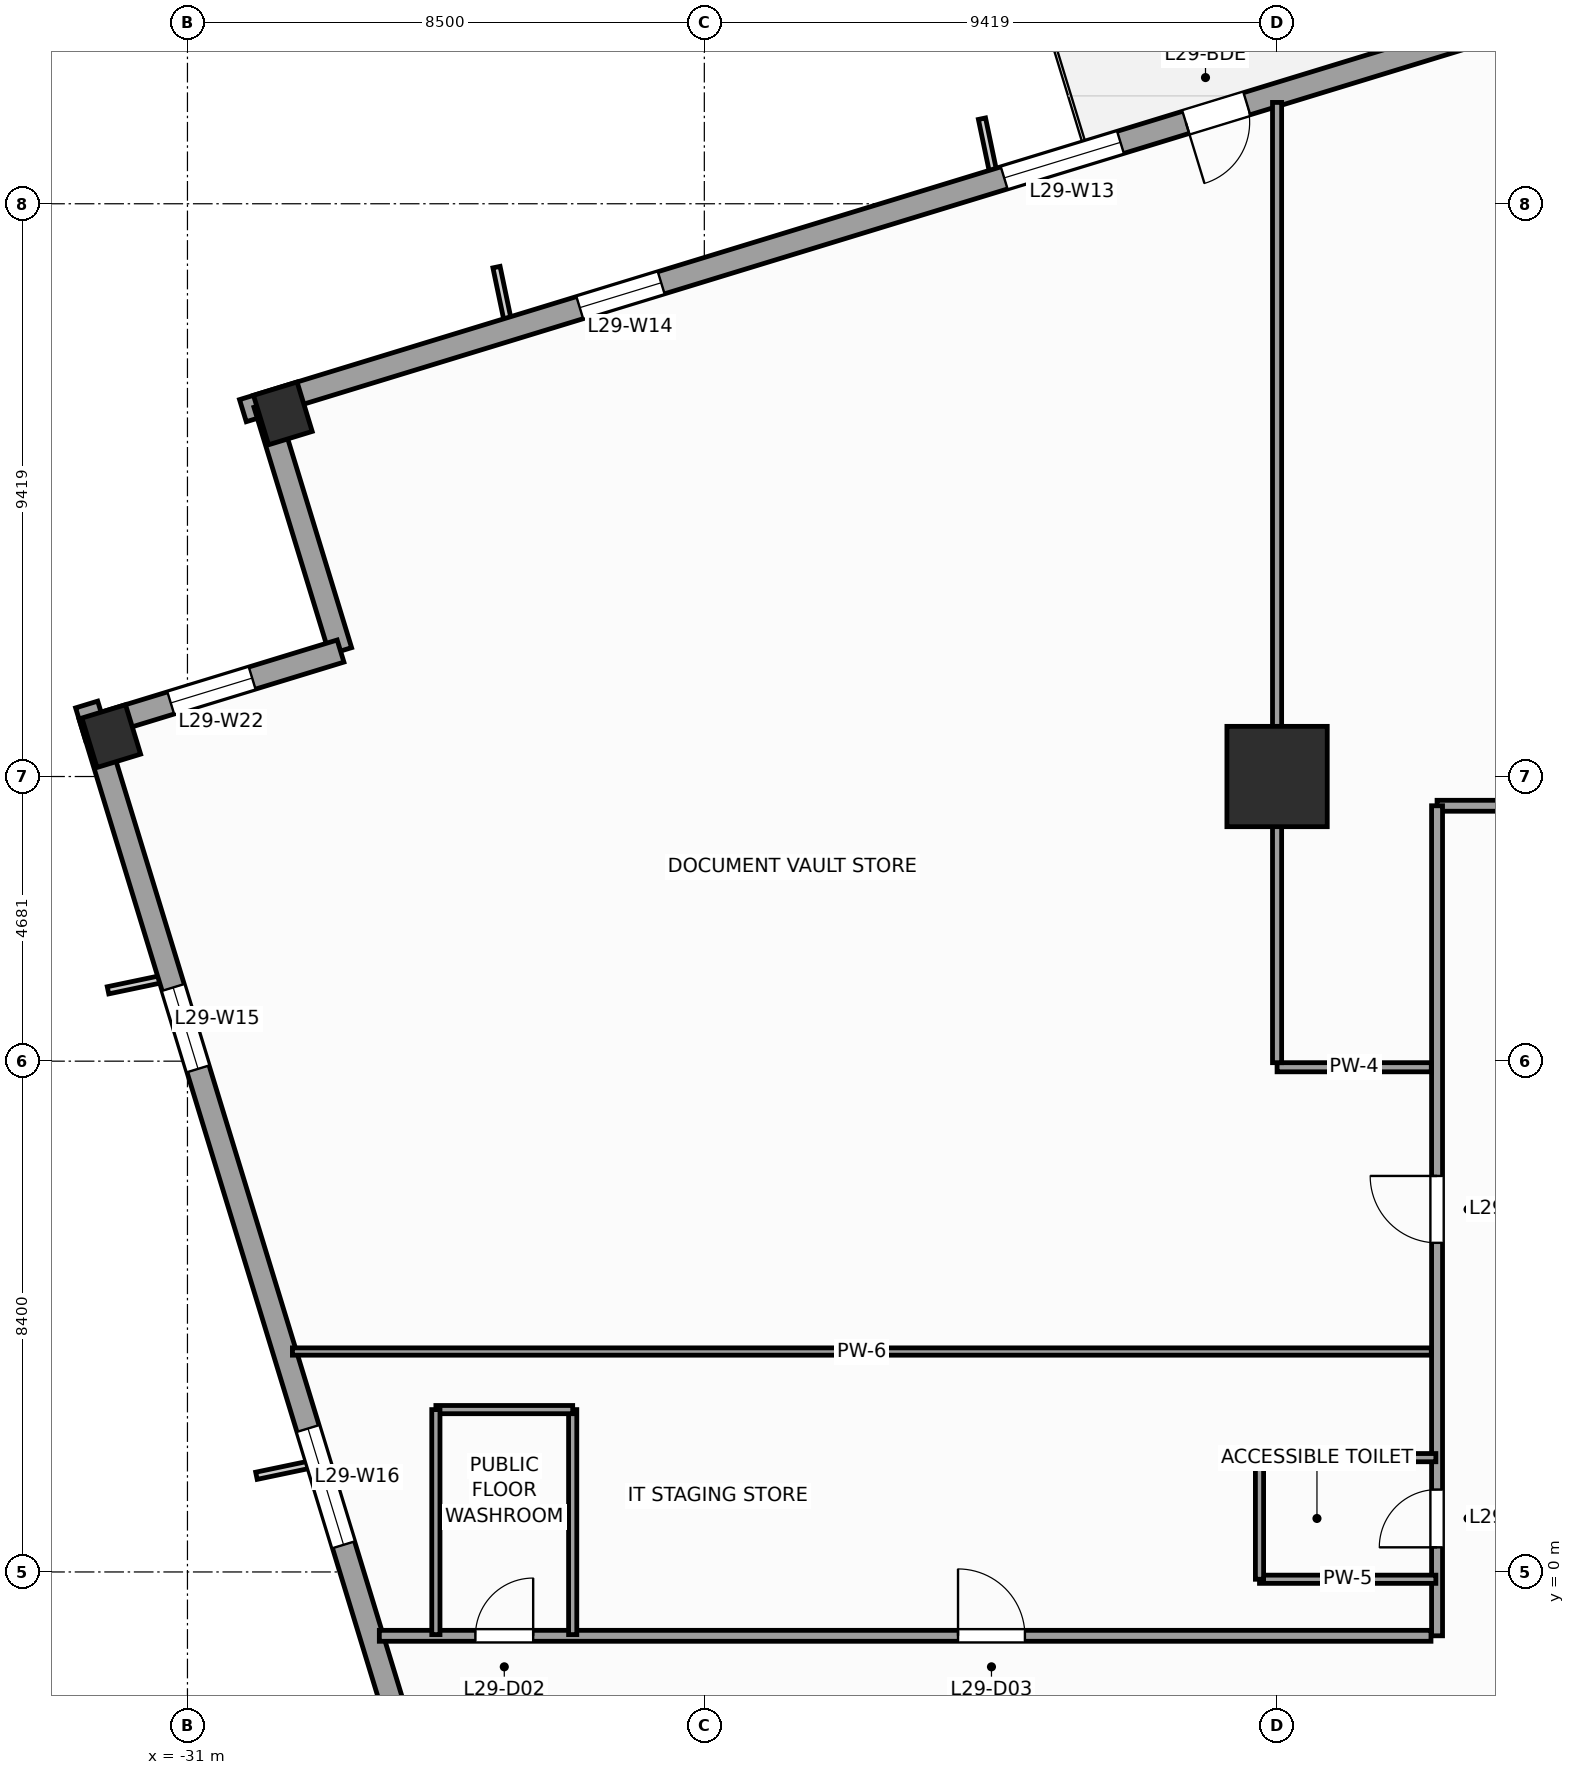
"""IFC4 building model, lengths in metres.
Left out: names, types, materials, properties, quantities, classifications, styles, units other than length and angle.
Written with IfcOpenShell. Run it as: python <this file> out.ifc"""

import sys

from ifc_helpers import new_model, si_unit, direction, frame, frame_2d, origin, origin_2d, place, context, subcontext, project, spatial, rectangle, extrude, source, transform, mapped, element, fill, save


model = new_model("IFC4")
c1 = context("Model", 3, precision=1e-05, world=origin(), true_north=direction((0.0, 1.0)))
c2 = subcontext(c1, "Body", "Model", "MODEL_VIEW")
j1 = project(units=[si_unit("LENGTHUNIT", "METRE"), si_unit("PLANEANGLEUNIT", "RADIAN")], contexts=[c1])
p1 = place(None, origin())
s1 = spatial("IfcSite", under=j1, at=p1, CompositionType="ELEMENT")
p2 = place(p1, origin())
s2 = spatial("IfcBuilding", under=s1, at=p2, CompositionType="ELEMENT")
p3 = place(p2, frame((0.0, 0.0, 123.2)))
s3 = spatial("IfcBuildingStorey", under=s2, at=p3, CompositionType="ELEMENT", Elevation=123.2)
m1 = source(origin(), c2, "Body", "SweptSolid", [
    extrude(rectangle(XDim=1.65, YDim=1.65, at=origin_2d()), origin(), (0.0, 0.0, 1.0), 4.0),
])
p4 = place(p3, frame((-13.081, 13.081, 0.0), z_axis=(0.0, 0.0, 1.0), x_axis=(1.0, 0.0, 0.0)))
e1 = element("IfcColumn", 1, at=p4, inside=s3, PredefinedType="COLUMN", context=c2, shape_type="MappedRepresentation", body=[
    mapped(m1, transform((0.0, 0.0, 0.0), scale=1.0)),
])
m2 = source(origin(), c2, "Body", "SweptSolid", [
    extrude(rectangle(XDim=0.75, YDim=0.85, at=origin_2d()), origin(), (0.0, 0.0, 1.0), 4.0),
])
for number, where, z_axis, x_axis in (
    (2, (-29.431, 19.052, 0.0), (0.0, 0.0, 1.0), (0.956, 0.292, 0.0)),
    (3, (-32.253, 13.746, 0.0), (0.0, 0.0, 1.0), (0.956, 0.292, 0.0)),
):
    element("IfcColumn", number, at=place(p3, frame(where, z_axis=z_axis, x_axis=x_axis)), inside=s3, PredefinedType="COLUMN", context=c2, shape_type="MappedRepresentation", body=[
        mapped(m2, transform((0.0, 0.0, 0.0), scale=1.0)),
    ])
p5 = place(p3, frame((14.265, 32.658, 0.0), z_axis=(0.0, 0.0, 1.0), x_axis=(-0.956304320851, -0.292373127906, 0.0)))
e4 = element("IfcWall", 4, at=p5, inside=s3, PredefinedType="STANDARD", context=c2, shape_type="SweptSolid", body=[
    extrude(rectangle(XDim=46.38, YDim=0.38, at=frame_2d((23.19, 0.0))), origin(), (0.0, 0.0, 1.0), 3.14),
])
p6 = place(p5, frame((29.115, 0.0, 0.0)))
e5 = element("IfcOpeningElement", 5, at=p6, cuts=e4, PredefinedType="OPENING", context=c2, shape_type="SweptSolid", body=[
    extrude(rectangle(XDim=1.05, YDim=2.25, at=frame_2d((0.525, 1.125))), frame((0.0, 0.2, 0.0), z_axis=(0.0, -1.0, 0.0), x_axis=(1.0, 0.0, 0.0)), (0.0, 0.0, 1.0), 0.4),
])
p7 = place(p5, frame((4.865, 0.0, 0.51)))
e6 = element("IfcOpeningElement", 6, at=p7, cuts=e4, PredefinedType="OPENING", context=c2, shape_type="SweptSolid", body=[
    extrude(rectangle(XDim=1.4, YDim=2.4, at=frame_2d((0.7, 1.2))), frame((0.0, 0.2, 0.0), z_axis=(0.0, -1.0, 0.0), x_axis=(1.0, 0.0, 0.0)), (0.0, 0.0, 1.0), 0.4),
])
p8 = place(p5, frame((12.45, 0.0, 0.51)))
e7 = element("IfcOpeningElement", 7, at=p8, cuts=e4, PredefinedType="OPENING", context=c2, shape_type="SweptSolid", body=[
    extrude(rectangle(XDim=2.0, YDim=2.4, at=frame_2d((1.0, 1.2))), frame((0.0, 0.2, 0.0), z_axis=(0.0, -1.0, 0.0), x_axis=(1.0, 0.0, 0.0)), (0.0, 0.0, 1.0), 0.4),
])
p9 = place(p5, frame((20.512, 0.0, 0.51)))
e8 = element("IfcOpeningElement", 8, at=p9, cuts=e4, PredefinedType="OPENING", context=c2, shape_type="SweptSolid", body=[
    extrude(rectangle(XDim=2.0, YDim=2.4, at=frame_2d((1.0, 1.2))), frame((0.0, 0.2, 0.0), z_axis=(0.0, -1.0, 0.0), x_axis=(1.0, 0.0, 0.0)), (0.0, 0.0, 1.0), 0.4),
])
p10 = place(p5, frame((31.288, 0.0, 0.51)))
e9 = element("IfcOpeningElement", 9, at=p10, cuts=e4, PredefinedType="OPENING", context=c2, shape_type="SweptSolid", body=[
    extrude(rectangle(XDim=2.0, YDim=2.4, at=frame_2d((1.0, 1.2))), frame((0.0, 0.2, 0.0), z_axis=(0.0, -1.0, 0.0), x_axis=(1.0, 0.0, 0.0)), (0.0, 0.0, 1.0), 0.4),
])
p11 = place(p5, frame((39.187, 0.0, 0.51)))
e10 = element("IfcOpeningElement", 10, at=p11, cuts=e4, PredefinedType="OPENING", context=c2, shape_type="SweptSolid", body=[
    extrude(rectangle(XDim=1.4, YDim=2.4, at=frame_2d((0.7, 1.2))), frame((0.0, 0.2, 0.0), z_axis=(0.0, -1.0, 0.0), x_axis=(1.0, 0.0, 0.0)), (0.0, 0.0, 1.0), 0.4),
])
p12 = place(p3, frame((-29.725, 19.208, 0.0), z_axis=(0.0, 0.0, 1.0), x_axis=(0.292345507338, -0.956312764915, 0.0)))
e11 = element("IfcWall", 11, at=p12, inside=s3, PredefinedType="STANDARD", context=c2, shape_type="SweptSolid", body=[
    extrude(rectangle(XDim=4.25, YDim=0.38, at=frame_2d((2.125, 0.0))), origin(), (0.0, 0.0, 1.0), 3.74),
])
p13 = place(p3, frame((-28.482, 15.144, 0.0), z_axis=(0.0, 0.0, 1.0), x_axis=(-0.956304176051, -0.292373601522, 0.0)))
e12 = element("IfcWall", 12, at=p13, inside=s3, PredefinedType="STANDARD", context=c2, shape_type="SweptSolid", body=[
    extrude(rectangle(XDim=4.44, YDim=0.38, at=frame_2d((2.22, 0.0))), origin(), (0.0, 0.0, 1.0), 3.04),
])
p14 = place(p13, frame((1.52, 0.0, 0.51)))
e13 = element("IfcOpeningElement", 13, at=p14, cuts=e12, PredefinedType="OPENING", context=c2, shape_type="SweptSolid", body=[
    extrude(rectangle(XDim=1.4, YDim=2.4, at=frame_2d((0.7, 1.2))), frame((0.0, 0.2, 0.0), z_axis=(0.0, -1.0, 0.0), x_axis=(1.0, 0.0, 0.0)), (0.0, 0.0, 1.0), 0.4),
])
p15 = place(p3, frame((-32.658, 14.265, 0.0), z_axis=(0.0, 0.0, 1.0), x_axis=(0.292373127906, -0.956304320851, 0.0)))
e14 = element("IfcWall", 14, at=p15, inside=s3, PredefinedType="STANDARD", context=c2, shape_type="SweptSolid", body=[
    extrude(rectangle(XDim=46.38, YDim=0.38, at=frame_2d((23.19, 0.0))), origin(), (0.0, 0.0, 1.0), 3.14),
])
p16 = place(p15, frame((4.865, 0.0, 0.51)))
e15 = element("IfcOpeningElement", 15, at=p16, cuts=e14, PredefinedType="OPENING", context=c2, shape_type="SweptSolid", body=[
    extrude(rectangle(XDim=1.4, YDim=2.4, at=frame_2d((0.7, 1.2))), frame((0.0, 0.2, 0.0), z_axis=(0.0, -1.0, 0.0), x_axis=(1.0, 0.0, 0.0)), (0.0, 0.0, 1.0), 0.4),
])
p17 = place(p15, frame((12.45, 0.0, 0.51)))
e16 = element("IfcOpeningElement", 16, at=p17, cuts=e14, PredefinedType="OPENING", context=c2, shape_type="SweptSolid", body=[
    extrude(rectangle(XDim=2.0, YDim=2.4, at=frame_2d((1.0, 1.2))), frame((0.0, 0.2, 0.0), z_axis=(0.0, -1.0, 0.0), x_axis=(1.0, 0.0, 0.0)), (0.0, 0.0, 1.0), 0.4),
])
p18 = place(p15, frame((20.512, 0.0, 0.51)))
e17 = element("IfcOpeningElement", 17, at=p18, cuts=e14, PredefinedType="OPENING", context=c2, shape_type="SweptSolid", body=[
    extrude(rectangle(XDim=2.0, YDim=2.4, at=frame_2d((1.0, 1.2))), frame((0.0, 0.2, 0.0), z_axis=(0.0, -1.0, 0.0), x_axis=(1.0, 0.0, 0.0)), (0.0, 0.0, 1.0), 0.4),
])
p19 = place(p15, frame((30.538, 0.0, 0.51)))
e18 = element("IfcOpeningElement", 18, at=p19, cuts=e14, PredefinedType="OPENING", context=c2, shape_type="SweptSolid", body=[
    extrude(rectangle(XDim=2.0, YDim=2.4, at=frame_2d((1.0, 1.2))), frame((0.0, 0.2, 0.0), z_axis=(0.0, -1.0, 0.0), x_axis=(1.0, 0.0, 0.0)), (0.0, 0.0, 1.0), 0.4),
])
p20 = place(p15, frame((39.187, 0.0, 0.51)))
e19 = element("IfcOpeningElement", 19, at=p20, cuts=e14, PredefinedType="OPENING", context=c2, shape_type="SweptSolid", body=[
    extrude(rectangle(XDim=1.4, YDim=2.4, at=frame_2d((0.7, 1.2))), frame((0.0, 0.2, 0.0), z_axis=(0.0, -1.0, 0.0), x_axis=(1.0, 0.0, 0.0)), (0.0, 0.0, 1.0), 0.4),
])
p21 = place(p3, frame((-10.45, 12.6, 0.0), z_axis=(0.0, 0.0, 1.0), x_axis=(1.0, 0.0, 0.0)))
e20 = element("IfcWall", 20, at=p21, inside=s3, PredefinedType="PARTITIONING", context=c2, shape_type="SweptSolid", body=[
    extrude(rectangle(XDim=22.0, YDim=0.18, at=frame_2d((11.0, 0.0))), origin(), (0.0, 0.0, 1.0), 3.74),
])
p22 = place(p21, frame((4.839, 0.0, 0.0)))
e21 = element("IfcOpeningElement", 21, at=p22, cuts=e20, PredefinedType="OPENING", context=c2, shape_type="SweptSolid", body=[
    extrude(rectangle(XDim=1.1, YDim=2.2, at=frame_2d((0.55, 1.1))), frame((0.0, 0.1, 0.0), z_axis=(0.0, -1.0, 0.0), x_axis=(1.0, 0.0, 0.0)), (0.0, 0.0, 1.0), 0.2),
])
p23 = place(p21, frame((13.1, 0.0, 0.0)))
e22 = element("IfcOpeningElement", 22, at=p23, cuts=e20, PredefinedType="OPENING", context=c2, shape_type="SweptSolid", body=[
    extrude(rectangle(XDim=1.1, YDim=2.2, at=frame_2d((0.55, 1.1))), frame((0.0, 0.1, 0.0), z_axis=(0.0, -1.0, 0.0), x_axis=(1.0, 0.0, 0.0)), (0.0, 0.0, 1.0), 0.2),
])
p24 = place(p21, frame((18.71, 0.0, 0.0)))
e23 = element("IfcOpeningElement", 23, at=p24, cuts=e20, PredefinedType="OPENING", context=c2, shape_type="SweptSolid", body=[
    extrude(rectangle(XDim=1.1, YDim=2.2, at=frame_2d((0.55, 1.1))), frame((0.0, 0.1, 0.0), z_axis=(0.0, -1.0, 0.0), x_axis=(1.0, 0.0, 0.0)), (0.0, 0.0, 1.0), 0.2),
])
p25 = place(p3, frame((-10.45, -1.05, 0.0), z_axis=(0.0, 0.0, 1.0), x_axis=(0.0, 1.0, 0.0)))
e24 = element("IfcWall", 24, at=p25, inside=s3, PredefinedType="PARTITIONING", context=c2, shape_type="SweptSolid", body=[
    extrude(rectangle(XDim=13.65, YDim=0.18, at=frame_2d((6.825, 0.0))), origin(), (0.0, 0.0, 1.0), 3.74),
])
p26 = place(p25, frame((1.455, 0.0, 0.0)))
e25 = element("IfcOpeningElement", 25, at=p26, cuts=e24, PredefinedType="OPENING", context=c2, shape_type="SweptSolid", body=[
    extrude(rectangle(XDim=0.95, YDim=2.1, at=frame_2d((0.475, 1.05))), frame((0.0, 0.1, 0.0), z_axis=(0.0, -1.0, 0.0), x_axis=(1.0, 0.0, 0.0)), (0.0, 0.0, 1.0), 0.2),
])
p27 = place(p25, frame((6.462, 0.0, 0.0)))
e26 = element("IfcOpeningElement", 26, at=p27, cuts=e24, PredefinedType="OPENING", context=c2, shape_type="SweptSolid", body=[
    extrude(rectangle(XDim=1.1, YDim=2.2, at=frame_2d((0.55, 1.1))), frame((0.0, 0.1, 0.0), z_axis=(0.0, -1.0, 0.0), x_axis=(1.0, 0.0, 0.0)), (0.0, 0.0, 1.0), 0.2),
])
p28 = place(p3, frame((-27.845, -1.05, 0.0), z_axis=(0.0, 0.0, 1.0), x_axis=(1.0, 0.0, 0.0)))
e27 = element("IfcWall", 27, at=p28, inside=s3, PredefinedType="PARTITIONING", context=c2, shape_type="SweptSolid", body=[
    extrude(rectangle(XDim=17.295, YDim=0.18, at=frame_2d((8.647, 0.0))), origin(), (0.0, 0.0, 1.0), 3.74),
])
p29 = place(p28, frame((1.58, 0.0, 0.0)))
e28 = element("IfcOpeningElement", 28, at=p29, cuts=e27, PredefinedType="OPENING", context=c2, shape_type="SweptSolid", body=[
    extrude(rectangle(XDim=0.95, YDim=2.1, at=frame_2d((0.475, 1.05))), frame((0.0, 0.1, 0.0), z_axis=(0.0, -1.0, 0.0), x_axis=(1.0, 0.0, 0.0)), (0.0, 0.0, 1.0), 0.2),
])
p30 = place(p28, frame((9.517, 0.0, 0.0)))
e29 = element("IfcOpeningElement", 29, at=p30, cuts=e27, PredefinedType="OPENING", context=c2, shape_type="SweptSolid", body=[
    extrude(rectangle(XDim=1.1, YDim=2.2, at=frame_2d((0.55, 1.1))), frame((0.0, 0.1, 0.0), z_axis=(0.0, -1.0, 0.0), x_axis=(1.0, 0.0, 0.0)), (0.0, 0.0, 1.0), 0.2),
])
p31 = place(p3, frame((-10.545, 8.3, 0.0), z_axis=(0.0, 0.0, 1.0), x_axis=(-1.0, 0.0, 0.0)))
e30 = element("IfcWall", 30, at=p31, inside=s3, PredefinedType="PARTITIONING", context=c2, shape_type="SweptSolid", body=[
    extrude(rectangle(XDim=2.536, YDim=0.15, at=frame_2d((1.268, 0.0))), origin(), (0.0, 0.0, 1.0), 3.74),
])
p32 = place(p3, frame((-13.081, 8.375, 0.0), z_axis=(0.0, 0.0, 1.0), x_axis=(0.0, 1.0, 0.0)))
e31 = element("IfcWall", 31, at=p32, inside=s3, PredefinedType="PARTITIONING", context=c2, shape_type="SweptSolid", body=[
    extrude(rectangle(XDim=15.792, YDim=0.15, at=frame_2d((7.896, 0.0))), origin(), (0.0, 0.0, 1.0), 2.732),
])
p33 = place(p3, frame((-29.274, 3.625, 0.0), z_axis=(0.0, 0.0, 1.0), x_axis=(1.0, 0.0, 0.0)))
e32 = element("IfcWall", 32, at=p33, inside=s3, PredefinedType="PARTITIONING", context=c2, shape_type="SweptSolid", body=[
    extrude(rectangle(XDim=18.729, YDim=0.12, at=frame_2d((9.365, 0.0))), origin(), (0.0, 0.0, 1.0), 3.74),
])
for number, where, z_axis, x_axis in (
    (33, (-13.37, -0.12, 0.0), (0.0, 0.0, 1.0), (1.0, 0.0, 0.0)),
    (34, (-13.37, 1.88, 0.0), (0.0, 0.0, 1.0), (1.0, 0.0, 0.0)),
):
    element("IfcWall", number, at=place(p3, frame(where, z_axis=z_axis, x_axis=x_axis)), inside=s3, PredefinedType="PARTITIONING", context=c2, shape_type="SweptSolid", body=[
        extrude(rectangle(XDim=2.9, YDim=0.135, at=frame_2d((1.45, 0.0))), origin(), (0.0, 0.0, 1.0), 3.74),
    ])
p34 = place(p3, frame((-13.37, -0.12, 0.0), z_axis=(0.0, 0.0, 1.0), x_axis=(0.0, 1.0, 0.0)))
e35 = element("IfcWall", 35, at=p34, inside=s3, PredefinedType="PARTITIONING", context=c2, shape_type="SweptSolid", body=[
    extrude(rectangle(XDim=2.0, YDim=0.135, at=frame_2d((1.0, 0.0))), origin(), (0.0, 0.0, 1.0), 2.732),
])
p35 = place(p3, frame((-24.665, -1.03, 0.0), z_axis=(0.0, 0.0, 1.0), x_axis=(0.0, 1.0, 0.0)))
e36 = element("IfcWall", 36, at=p35, inside=s3, PredefinedType="PARTITIONING", context=c2, shape_type="SweptSolid", body=[
    extrude(rectangle(XDim=3.7, YDim=0.135, at=frame_2d((1.85, 0.0))), origin(), (0.0, 0.0, 1.0), 3.74),
])
p36 = place(p3, frame((-26.915, 2.67, 0.0), z_axis=(0.0, 0.0, 1.0), x_axis=(1.0, 0.0, 0.0)))
e37 = element("IfcWall", 37, at=p36, inside=s3, PredefinedType="PARTITIONING", context=c2, shape_type="SweptSolid", body=[
    extrude(rectangle(XDim=2.25, YDim=0.135, at=frame_2d((1.125, 0.0))), origin(), (0.0, 0.0, 1.0), 3.74),
])
p37 = place(p3, frame((-26.915, -1.03, 0.0), z_axis=(0.0, 0.0, 1.0), x_axis=(0.0, 1.0, 0.0)))
e38 = element("IfcWall", 38, at=p37, inside=s3, PredefinedType="PARTITIONING", context=c2, shape_type="SweptSolid", body=[
    extrude(rectangle(XDim=3.7, YDim=0.135, at=frame_2d((1.85, 0.0))), origin(), (0.0, 0.0, 1.0), 3.74),
])
m3 = source(origin(), c2, "Body", "SweptSolid", [
    extrude(rectangle(XDim=1.05, YDim=2.25, at=frame_2d((0.525, 1.125))), frame((0.0, 0.025, 0.0), z_axis=(0.0, -1.0, 0.0), x_axis=(1.0, 0.0, 0.0)), (0.0, 0.0, 1.0), 0.05),
])
p38 = place(p6, origin())
e39 = element("IfcDoor", 39, at=p38, inside=s3, OperationType="SINGLE_SWING_RIGHT", PredefinedType="DOOR", context=c2, shape_type="MappedRepresentation", body=[
    mapped(m3, transform((0.0, 0.0, 0.0), scale=1.0)),
])
fill(e5, e39)
m4 = source(origin(), c2, "Body", "SweptSolid", [
    extrude(rectangle(XDim=2.0, YDim=2.4, at=frame_2d((1.0, 1.2))), frame((0.0, 0.03, 0.0), z_axis=(0.0, -1.0, 0.0), x_axis=(1.0, 0.0, 0.0)), (0.0, 0.0, 1.0), 0.06),
])
p39 = place(p10, origin())
e40 = element("IfcWindow", 40, at=p39, inside=s3, PartitioningType="SINGLE_PANEL", PredefinedType="WINDOW", context=c2, shape_type="MappedRepresentation", body=[
    mapped(m4, transform((0.0, 0.0, 0.0), scale=1.0)),
])
fill(e9, e40)
m5 = source(origin(), c2, "Body", "SweptSolid", [
    extrude(rectangle(XDim=1.4, YDim=2.4, at=frame_2d((0.7, 1.2))), frame((0.0, 0.03, 0.0), z_axis=(0.0, -1.0, 0.0), x_axis=(1.0, 0.0, 0.0)), (0.0, 0.0, 1.0), 0.06),
])
p40 = place(p11, origin())
e41 = element("IfcWindow", 41, at=p40, inside=s3, PartitioningType="SINGLE_PANEL", PredefinedType="WINDOW", context=c2, shape_type="MappedRepresentation", body=[
    mapped(m5, transform((0.0, 0.0, 0.0), scale=1.0)),
])
fill(e10, e41)
p41 = place(p16, origin())
e42 = element("IfcWindow", 42, at=p41, inside=s3, PartitioningType="SINGLE_PANEL", PredefinedType="WINDOW", context=c2, shape_type="MappedRepresentation", body=[
    mapped(m5, transform((0.0, 0.0, 0.0), scale=1.0)),
])
fill(e15, e42)
p42 = place(p17, origin())
e43 = element("IfcWindow", 43, at=p42, inside=s3, PartitioningType="SINGLE_PANEL", PredefinedType="WINDOW", context=c2, shape_type="MappedRepresentation", body=[
    mapped(m4, transform((0.0, 0.0, 0.0), scale=1.0)),
])
fill(e16, e43)
p43 = place(p14, origin())
e44 = element("IfcWindow", 44, at=p43, inside=s3, PartitioningType="SINGLE_PANEL", PredefinedType="WINDOW", context=c2, shape_type="MappedRepresentation", body=[
    mapped(m5, transform((0.0, 0.0, 0.0), scale=1.0)),
])
fill(e13, e44)
m6 = source(origin(), c2, "Body", "SweptSolid", [
    extrude(rectangle(XDim=0.95, YDim=2.1, at=frame_2d((0.475, 1.05))), frame((0.0, 0.025, 0.0), z_axis=(0.0, -1.0, 0.0), x_axis=(1.0, 0.0, 0.0)), (0.0, 0.0, 1.0), 0.05),
])
p44 = place(p26, origin())
e45 = element("IfcDoor", 45, at=p44, inside=s3, OperationType="SINGLE_SWING_LEFT", PredefinedType="DOOR", context=c2, shape_type="MappedRepresentation", body=[
    mapped(m6, transform((0.0, 0.0, 0.0), scale=1.0)),
])
fill(e25, e45)
p45 = place(p29, origin())
e46 = element("IfcDoor", 46, at=p45, inside=s3, OperationType="SINGLE_SWING_RIGHT", PredefinedType="DOOR", context=c2, shape_type="MappedRepresentation", body=[
    mapped(m6, transform((0.0, 0.0, 0.0), scale=1.0)),
])
fill(e28, e46)
m7 = source(origin(), c2, "Body", "SweptSolid", [
    extrude(rectangle(XDim=1.1, YDim=2.2, at=frame_2d((0.55, 1.1))), frame((0.0, 0.025, 0.0), z_axis=(0.0, -1.0, 0.0), x_axis=(1.0, 0.0, 0.0)), (0.0, 0.0, 1.0), 0.05),
])
p46 = place(p30, origin())
e47 = element("IfcDoor", 47, at=p46, inside=s3, OperationType="SINGLE_SWING_LEFT", PredefinedType="DOOR", context=c2, shape_type="MappedRepresentation", body=[
    mapped(m7, transform((0.0, 0.0, 0.0), scale=1.0)),
])
fill(e29, e47)
p47 = place(p27, origin())
e48 = element("IfcDoor", 48, at=p47, inside=s3, OperationType="SINGLE_SWING_RIGHT", PredefinedType="DOOR", context=c2, shape_type="MappedRepresentation", body=[
    mapped(m7, transform((0.0, 0.0, 0.0), scale=1.0)),
])
fill(e26, e48)
save(model, sys.argv[1])
